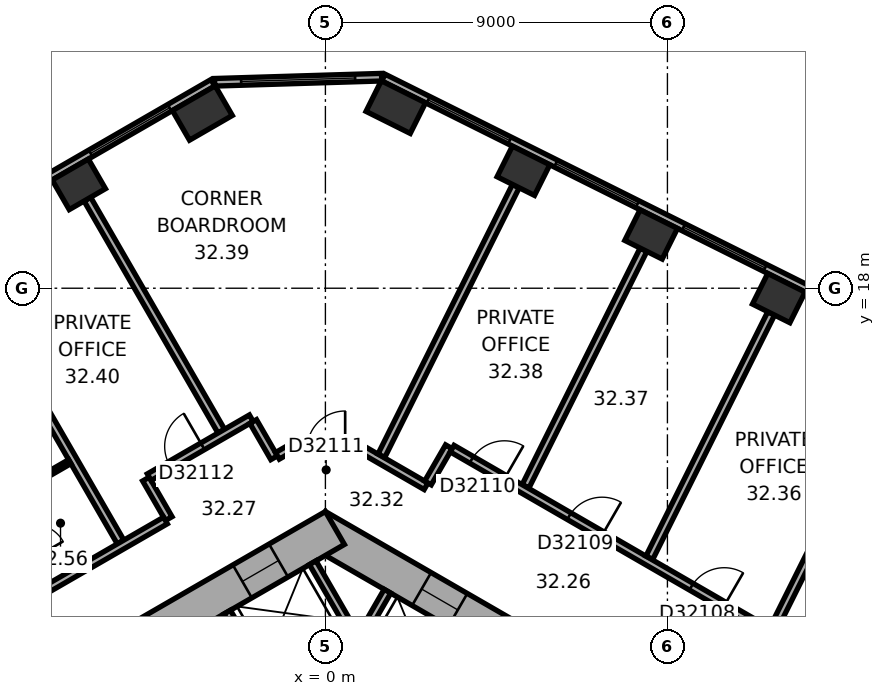
"""IFC4 building model, lengths in metres.
Left out: names, types, materials, properties, quantities, classifications, styles, units other than length and angle.
Written with IfcOpenShell. Run it as: python <this file> out.ifc"""

import sys

from ifc_helpers import new_model, si_unit, direction, frame, frame_2d, origin, origin_2d, place, context, subcontext, project, spatial, rectangle, extrude, element, fill, save


model = new_model("IFC4")
c1 = context("Model", 3, precision=1e-05, world=origin(), true_north=direction((0.0, 1.0)))
c2 = subcontext(c1, "Body", "Model", "MODEL_VIEW")
j1 = project(units=[si_unit("LENGTHUNIT", "METRE"), si_unit("PLANEANGLEUNIT", "RADIAN")], contexts=[c1])
p1 = place(None, origin())
s1 = spatial("IfcSite", under=j1, at=p1, CompositionType="ELEMENT")
p2 = place(p1, origin())
s2 = spatial("IfcBuilding", under=s1, at=p2, CompositionType="ELEMENT")
p3 = place(p2, frame((0.0, 0.0, 131.8)))
s3 = spatial("IfcBuildingStorey", under=s2, at=p3, CompositionType="ELEMENT", Elevation=131.8)
for number, where, z_axis, x_axis in (
    (1, (11.931, 17.74, 0.0), (0.0, 0.0, 1.0), (-0.895, 0.446, 0.0)),
    (2, (8.571, 19.416, 0.0), (0.0, 0.0, 1.0), (-0.895, 0.446, 0.0)),
    (3, (5.211, 21.091, 0.0), (0.0, 0.0, 1.0), (-0.895, 0.446, 0.0)),
):
    element("IfcColumn", number, at=place(p3, frame(where, z_axis=z_axis, x_axis=x_axis)), inside=s3, PredefinedType="COLUMN", context=c2, shape_type="SweptSolid", body=[
        extrude(rectangle(XDim=1.1, YDim=0.9, at=origin_2d()), origin(), (0.0, 0.0, 1.0), 3.7),
    ])
for number, where, z_axis, x_axis in (
    (4, (1.852, 22.766, 0.0), (0.0, 0.0, 1.0), (-0.895, 0.446, 0.0)),
    (5, (-3.238, 22.61, 0.0), (0.0, 0.0, 1.0), (-0.866, -0.5, 0.0)),
):
    element("IfcColumn", number, at=place(p3, frame(where, z_axis=z_axis, x_axis=x_axis)), inside=s3, PredefinedType="COLUMN", context=c2, shape_type="SweptSolid", body=[
        extrude(rectangle(XDim=1.3, YDim=0.9, at=origin_2d()), origin(), (0.0, 0.0, 1.0), 3.7),
    ])
p4 = place(p3, frame((-6.489, 20.733, 0.0), z_axis=(0.0, 0.0, 1.0), x_axis=(-0.866025403784, -0.5, 0.0)))
e6 = element("IfcColumn", 6, at=p4, inside=s3, PredefinedType="COLUMN", context=c2, shape_type="SweptSolid", body=[
    extrude(rectangle(XDim=1.1, YDim=0.9, at=origin_2d()), origin(), (0.0, 0.0, 1.0), 3.7),
])
p5 = place(p3, frame((10.25, 5.629, 0.0), z_axis=(0.0, 0.0, 1.0), x_axis=(-0.866022616891, 0.50000482701, 0.0)))
e7 = element("IfcWall", 7, at=p5, inside=s3, PredefinedType="SHEAR", context=c2, shape_type="SweptSolid", body=[
    extrude(rectangle(XDim=12.125, YDim=1.0, at=frame_2d((6.062, 0.0))), origin(), (0.0, 0.0, 1.0), 3.7),
])
p6 = place(p5, frame((2.612, 0.0, 0.0)))
e8 = element("IfcOpeningElement", 8, at=p6, cuts=e7, PredefinedType="OPENING", context=c2, shape_type="SweptSolid", body=[
    extrude(rectangle(XDim=1.1, YDim=2.1, at=frame_2d((0.55, 1.05))), frame((0.0, 0.51, 0.0), z_axis=(0.0, -1.0, 0.0), x_axis=(1.0, 0.0, 0.0)), (0.0, 0.0, 1.0), 1.02),
])
p7 = place(p5, frame((5.212, 0.0, 0.0)))
e9 = element("IfcOpeningElement", 9, at=p7, cuts=e7, PredefinedType="OPENING", context=c2, shape_type="SweptSolid", body=[
    extrude(rectangle(XDim=1.1, YDim=2.1, at=frame_2d((0.55, 1.05))), frame((0.0, 0.51, 0.0), z_axis=(0.0, -1.0, 0.0), x_axis=(1.0, 0.0, 0.0)), (0.0, 0.0, 1.0), 1.02),
])
p8 = place(p5, frame((7.812, 0.0, 0.0)))
e10 = element("IfcOpeningElement", 10, at=p8, cuts=e7, PredefinedType="OPENING", context=c2, shape_type="SweptSolid", body=[
    extrude(rectangle(XDim=1.1, YDim=2.1, at=frame_2d((0.55, 1.05))), frame((0.0, 0.51, 0.0), z_axis=(0.0, -1.0, 0.0), x_axis=(1.0, 0.0, 0.0)), (0.0, 0.0, 1.0), 1.02),
])
p9 = place(p3, frame((0.25, 11.691, 0.0), z_axis=(0.0, 0.0, 1.0), x_axis=(-0.866022616891, -0.50000482701, 0.0)))
e11 = element("IfcWall", 11, at=p9, inside=s3, PredefinedType="SHEAR", context=c2, shape_type="SweptSolid", body=[
    extrude(rectangle(XDim=12.125, YDim=1.0, at=frame_2d((6.062, 0.0))), origin(), (0.0, 0.0, 1.0), 3.7),
])
p10 = place(p9, frame((6.262, 0.0, 0.0)))
e12 = element("IfcOpeningElement", 12, at=p10, cuts=e11, PredefinedType="OPENING", context=c2, shape_type="SweptSolid", body=[
    extrude(rectangle(XDim=1.5, YDim=2.1, at=frame_2d((0.75, 1.05))), frame((0.0, 0.51, 0.0), z_axis=(0.0, -1.0, 0.0), x_axis=(1.0, 0.0, 0.0)), (0.0, 0.0, 1.0), 1.02),
])
p11 = place(p9, frame((1.712, 0.0, 0.0)))
e13 = element("IfcOpeningElement", 13, at=p11, cuts=e11, PredefinedType="OPENING", context=c2, shape_type="SweptSolid", body=[
    extrude(rectangle(XDim=1.1, YDim=2.1, at=frame_2d((0.55, 1.05))), frame((0.0, 0.51, 0.0), z_axis=(0.0, -1.0, 0.0), x_axis=(1.0, 0.0, 0.0)), (0.0, 0.0, 1.0), 1.02),
])
p12 = place(p3, frame((19.464, 14.599, 0.0), z_axis=(0.0, 0.0, 1.0), x_axis=(-0.894935755043, 0.446195018289, 0.0)))
e14 = element("IfcWall", 14, at=p12, inside=s3, PredefinedType="STANDARD", context=c2, shape_type="SweptSolid", body=[
    extrude(rectangle(XDim=20.044, YDim=0.2, at=frame_2d((10.022, 0.0))), origin(), (0.0, 0.0, 1.0), 3.7),
])
p13 = place(p12, frame((1.313, 0.0, 0.9)))
e15 = element("IfcOpeningElement", 15, at=p13, cuts=e14, PredefinedType="OPENING", context=c2, shape_type="SweptSolid", body=[
    extrude(rectangle(XDim=2.4, YDim=2.0, at=frame_2d((1.2, 1.0))), frame((0.0, 0.11, 0.0), z_axis=(0.0, -1.0, 0.0), x_axis=(1.0, 0.0, 0.0)), (0.0, 0.0, 1.0), 0.22),
])
p14 = place(p12, frame((5.067, 0.0, 0.9)))
e16 = element("IfcOpeningElement", 16, at=p14, cuts=e14, PredefinedType="OPENING", context=c2, shape_type="SweptSolid", body=[
    extrude(rectangle(XDim=2.4, YDim=2.0, at=frame_2d((1.2, 1.0))), frame((0.0, 0.11, 0.0), z_axis=(0.0, -1.0, 0.0), x_axis=(1.0, 0.0, 0.0)), (0.0, 0.0, 1.0), 0.22),
])
p15 = place(p12, frame((8.821, 0.0, 0.9)))
e17 = element("IfcOpeningElement", 17, at=p15, cuts=e14, PredefinedType="OPENING", context=c2, shape_type="SweptSolid", body=[
    extrude(rectangle(XDim=2.4, YDim=2.0, at=frame_2d((1.2, 1.0))), frame((0.0, 0.11, 0.0), z_axis=(0.0, -1.0, 0.0), x_axis=(1.0, 0.0, 0.0)), (0.0, 0.0, 1.0), 0.22),
])
p16 = place(p12, frame((12.575, 0.0, 0.9)))
e18 = element("IfcOpeningElement", 18, at=p16, cuts=e14, PredefinedType="OPENING", context=c2, shape_type="SweptSolid", body=[
    extrude(rectangle(XDim=2.4, YDim=2.0, at=frame_2d((1.2, 1.0))), frame((0.0, 0.11, 0.0), z_axis=(0.0, -1.0, 0.0), x_axis=(1.0, 0.0, 0.0)), (0.0, 0.0, 1.0), 0.22),
])
p17 = place(p12, frame((16.329, 0.0, 0.9)))
e19 = element("IfcOpeningElement", 19, at=p17, cuts=e14, PredefinedType="OPENING", context=c2, shape_type="SweptSolid", body=[
    extrude(rectangle(XDim=2.4, YDim=2.0, at=frame_2d((1.2, 1.0))), frame((0.0, 0.11, 0.0), z_axis=(0.0, -1.0, 0.0), x_axis=(1.0, 0.0, 0.0)), (0.0, 0.0, 1.0), 0.22),
])
p18 = place(p3, frame((1.479, 23.553, 0.0), z_axis=(0.0, 0.0, 1.0), x_axis=(-0.999534786117, -0.03049936625, 0.0)))
e20 = element("IfcWall", 20, at=p18, inside=s3, PredefinedType="STANDARD", context=c2, shape_type="SweptSolid", body=[
    extrude(rectangle(XDim=4.395, YDim=0.2, at=frame_2d((2.197, 0.0))), origin(), (0.0, 0.0, 1.0), 3.7),
])
p19 = place(p18, frame((0.698, 0.0, 0.9)))
e21 = element("IfcOpeningElement", 21, at=p19, cuts=e20, PredefinedType="OPENING", context=c2, shape_type="SweptSolid", body=[
    extrude(rectangle(XDim=3.0, YDim=2.0, at=frame_2d((1.5, 1.0))), frame((0.0, 0.11, 0.0), z_axis=(0.0, -1.0, 0.0), x_axis=(1.0, 0.0, 0.0)), (0.0, 0.0, 1.0), 0.22),
])
p20 = place(p3, frame((-2.961, 23.405, 0.0), z_axis=(0.0, 0.0, 1.0), x_axis=(-0.866023315909, -0.500003616288, 0.0)))
e22 = element("IfcWall", 22, at=p20, inside=s3, PredefinedType="STANDARD", context=c2, shape_type="SweptSolid", body=[
    extrude(rectangle(XDim=20.044, YDim=0.2, at=frame_2d((10.022, 0.0))), origin(), (0.0, 0.0, 1.0), 3.7),
])
p21 = place(p20, frame((1.314, 0.0, 0.9)))
e23 = element("IfcOpeningElement", 23, at=p21, cuts=e22, PredefinedType="OPENING", context=c2, shape_type="SweptSolid", body=[
    extrude(rectangle(XDim=2.4, YDim=2.0, at=frame_2d((1.2, 1.0))), frame((0.0, 0.11, 0.0), z_axis=(0.0, -1.0, 0.0), x_axis=(1.0, 0.0, 0.0)), (0.0, 0.0, 1.0), 0.22),
])
p22 = place(p20, frame((5.069, 0.0, 0.9)))
e24 = element("IfcOpeningElement", 24, at=p22, cuts=e22, PredefinedType="OPENING", context=c2, shape_type="SweptSolid", body=[
    extrude(rectangle(XDim=2.4, YDim=2.0, at=frame_2d((1.2, 1.0))), frame((0.0, 0.11, 0.0), z_axis=(0.0, -1.0, 0.0), x_axis=(1.0, 0.0, 0.0)), (0.0, 0.0, 1.0), 0.22),
])
p23 = place(p20, frame((8.823, 0.0, 0.9)))
e25 = element("IfcOpeningElement", 25, at=p23, cuts=e22, PredefinedType="OPENING", context=c2, shape_type="SweptSolid", body=[
    extrude(rectangle(XDim=2.4, YDim=2.0, at=frame_2d((1.2, 1.0))), frame((0.0, 0.11, 0.0), z_axis=(0.0, -1.0, 0.0), x_axis=(1.0, 0.0, 0.0)), (0.0, 0.0, 1.0), 0.22),
])
p24 = place(p20, frame((12.577, 0.0, 0.9)))
e26 = element("IfcOpeningElement", 26, at=p24, cuts=e22, PredefinedType="OPENING", context=c2, shape_type="SweptSolid", body=[
    extrude(rectangle(XDim=2.4, YDim=2.0, at=frame_2d((1.2, 1.0))), frame((0.0, 0.11, 0.0), z_axis=(0.0, -1.0, 0.0), x_axis=(1.0, 0.0, 0.0)), (0.0, 0.0, 1.0), 0.22),
])
p25 = place(p20, frame((16.331, 0.0, 0.9)))
e27 = element("IfcOpeningElement", 27, at=p25, cuts=e22, PredefinedType="OPENING", context=c2, shape_type="SweptSolid", body=[
    extrude(rectangle(XDim=2.4, YDim=2.0, at=frame_2d((1.2, 1.0))), frame((0.0, 0.11, 0.0), z_axis=(0.0, -1.0, 0.0), x_axis=(1.0, 0.0, 0.0)), (0.0, 0.0, 1.0), 0.22),
])
p26 = place(p3, frame((0.532, 8.122, 0.0), z_axis=(0.0, 0.0, 1.0), x_axis=(0.500077893725, 0.86598042715, 0.0)))
e28 = element("IfcWall", 28, at=p26, inside=s3, PredefinedType="PARTITIONING", context=c2, shape_type="SweptSolid", body=[
    extrude(rectangle(XDim=2.2, YDim=0.2, at=frame_2d((1.1, 0.0))), origin(), (0.0, 0.0, 1.0), 3.42),
])
p27 = place(p3, frame((0.767, 8.872, 0.0), z_axis=(0.0, 0.0, 1.0), x_axis=(-0.499994660107, 0.866028486751, 0.0)))
e29 = element("IfcWall", 29, at=p27, inside=s3, PredefinedType="PARTITIONING", context=c2, shape_type="SweptSolid", body=[
    extrude(rectangle(XDim=2.2, YDim=0.2, at=frame_2d((1.1, 0.0))), origin(), (0.0, 0.0, 1.0), 3.42),
])
p28 = place(p3, frame((-1.485, 7.572, 0.0), z_axis=(0.0, 0.0, 1.0), x_axis=(-0.50002983664, 0.866008176907, 0.0)))
e30 = element("IfcWall", 30, at=p28, inside=s3, PredefinedType="PARTITIONING", context=c2, shape_type="SweptSolid", body=[
    extrude(rectangle(XDim=2.2, YDim=0.2, at=frame_2d((1.1, 0.0))), origin(), (0.0, 0.0, 1.0), 3.42),
])
p29 = place(p3, frame((-9.515, 18.466, 0.0), z_axis=(0.0, 0.0, 1.0), x_axis=(0.500009360108, -0.866019999656, 0.0)))
e31 = element("IfcWall", 31, at=p29, inside=s3, PredefinedType="PARTITIONING", context=c2, shape_type="SweptSolid", body=[
    extrude(rectangle(XDim=8.25, YDim=0.2, at=frame_2d((4.125, 0.0))), origin(), (0.0, 0.0, 1.0), 2.87),
])
p30 = place(p3, frame((-8.545, 12.387, 0.0), z_axis=(0.0, 0.0, 1.0), x_axis=(0.866009402589, 0.500027713859, 0.0)))
e32 = element("IfcWall", 32, at=p30, inside=s3, PredefinedType="PARTITIONING", context=c2, shape_type="SweptSolid", body=[
    extrude(rectangle(XDim=2.1, YDim=0.12, at=frame_2d((1.05, 0.0))), origin(), (0.0, 0.0, 1.0), 3.42),
])
p31 = place(p3, frame((-6.264, 20.344, 0.0), z_axis=(0.0, 0.0, 1.0), x_axis=(0.500009260695, -0.866020057054, 0.0)))
e33 = element("IfcWall", 33, at=p31, inside=s3, PredefinedType="PARTITIONING", context=c2, shape_type="SweptSolid", body=[
    extrude(rectangle(XDim=7.049, YDim=0.2, at=frame_2d((3.524, 0.0))), origin(), (0.0, 0.0, 1.0), 3.42),
])
p32 = place(p3, frame((-4.723, 12.978, 0.0), z_axis=(0.0, 0.0, 1.0), x_axis=(0.500074377092, -0.865982457891, 0.0)))
e34 = element("IfcWall", 34, at=p32, inside=s3, PredefinedType="PARTITIONING", context=c2, shape_type="SweptSolid", body=[
    extrude(rectangle(XDim=1.201, YDim=0.2, at=frame_2d((0.601, 0.0))), origin(), (0.0, 0.0, 1.0), 3.42),
])
p33 = place(p3, frame((-4.209, 11.888, 0.0), z_axis=(0.0, 0.0, 1.0), x_axis=(-0.866020930448, -0.500007747966, 0.0)))
e35 = element("IfcWall", 35, at=p33, inside=s3, PredefinedType="PARTITIONING", context=c2, shape_type="SweptSolid", body=[
    extrude(rectangle(XDim=8.321, YDim=0.2, at=frame_2d((4.161, 0.0))), origin(), (0.0, 0.0, 1.0), 3.42),
])
p34 = place(p33, frame((5.439, 0.0, 0.0)))
e36 = element("IfcOpeningElement", 36, at=p34, cuts=e35, PredefinedType="OPENING", context=c2, shape_type="SweptSolid", body=[
    extrude(rectangle(XDim=1.0, YDim=2.1, at=frame_2d((0.5, 1.05))), frame((0.0, 0.11, 0.0), z_axis=(0.0, -1.0, 0.0), x_axis=(1.0, 0.0, 0.0)), (0.0, 0.0, 1.0), 0.22),
])
p35 = place(p3, frame((-1.95, 14.579, 0.0), z_axis=(0.0, 0.0, 1.0), x_axis=(-0.866011260204, -0.500024496599, 0.0)))
e37 = element("IfcWall", 37, at=p35, inside=s3, PredefinedType="PARTITIONING", context=c2, shape_type="SweptSolid", body=[
    extrude(rectangle(XDim=3.102, YDim=0.2, at=frame_2d((1.551, 0.0))), origin(), (0.0, 0.0, 1.0), 3.42),
])
p36 = place(p35, frame((1.478, 0.0, 0.0)))
e38 = element("IfcOpeningElement", 38, at=p36, cuts=e37, PredefinedType="OPENING", context=c2, shape_type="SweptSolid", body=[
    extrude(rectangle(XDim=1.0, YDim=2.1, at=frame_2d((0.5, 1.05))), frame((0.0, 0.11, 0.0), z_axis=(0.0, -1.0, 0.0), x_axis=(1.0, 0.0, 0.0)), (0.0, 0.0, 1.0), 0.22),
])
p37 = place(p3, frame((-1.349, 13.539, 0.0), z_axis=(0.0, 0.0, 1.0), x_axis=(-0.500074377092, 0.865982457891, 0.0)))
e39 = element("IfcWall", 39, at=p37, inside=s3, PredefinedType="PARTITIONING", context=c2, shape_type="SweptSolid", body=[
    extrude(rectangle(XDim=1.101, YDim=0.2, at=frame_2d((0.55, 0.0))), origin(), (0.0, 0.0, 1.0), 3.42),
])
p38 = place(p3, frame((-0.95, 13.77, 0.0), z_axis=(0.0, 0.0, 1.0), x_axis=(-0.865904111586, -0.500210025428, 0.0)))
e40 = element("IfcWall", 40, at=p38, inside=s3, PredefinedType="PARTITIONING", context=c2, shape_type="SweptSolid", body=[
    extrude(rectangle(XDim=0.361, YDim=0.2, at=frame_2d((0.181, 0.0))), origin(), (0.0, 0.0, 1.0), 3.42),
])
p39 = place(p3, frame((0.95, 13.77, 0.0), z_axis=(0.0, 0.0, 1.0), x_axis=(-1.0, 0.0, 0.0)))
e41 = element("IfcWall", 41, at=p39, inside=s3, PredefinedType="PARTITIONING", context=c2, shape_type="SweptSolid", body=[
    extrude(rectangle(XDim=1.86, YDim=0.2, at=frame_2d((0.93, 0.0))), origin(), (0.0, 0.0, 1.0), 3.42),
])
p40 = place(p39, frame((0.43, 0.0, 0.0)))
e42 = element("IfcOpeningElement", 42, at=p40, cuts=e41, PredefinedType="OPENING", context=c2, shape_type="SweptSolid", body=[
    extrude(rectangle(XDim=1.0, YDim=2.1, at=frame_2d((0.5, 1.05))), frame((0.0, 0.11, 0.0), z_axis=(0.0, -1.0, 0.0), x_axis=(1.0, 0.0, 0.0)), (0.0, 0.0, 1.0), 0.22),
])
p41 = place(p3, frame((2.648, 12.789, 0.0), z_axis=(0.0, 0.0, 1.0), x_axis=(-0.8660607342, 0.499938800931, 0.0)))
e43 = element("IfcWall", 43, at=p41, inside=s3, PredefinedType="PARTITIONING", context=c2, shape_type="SweptSolid", body=[
    extrude(rectangle(XDim=1.921, YDim=0.2, at=frame_2d((0.96, 0.0))), origin(), (0.0, 0.0, 1.0), 3.42),
])
p42 = place(p3, frame((3.249, 13.829, 0.0), z_axis=(0.0, 0.0, 1.0), x_axis=(-0.499812034598, -0.866133898465, 0.0)))
e44 = element("IfcWall", 44, at=p42, inside=s3, PredefinedType="PARTITIONING", context=c2, shape_type="SweptSolid", body=[
    extrude(rectangle(XDim=1.101, YDim=0.2, at=frame_2d((0.551, 0.0))), origin(), (0.0, 0.0, 1.0), 3.42),
])
p43 = place(p3, frame((5.01, 20.688, 0.0), z_axis=(0.0, 0.0, 1.0), x_axis=(-0.446203062394, -0.894931744386, 0.0)))
e45 = element("IfcWall", 45, at=p43, inside=s3, PredefinedType="PARTITIONING", context=c2, shape_type="SweptSolid", body=[
    extrude(rectangle(XDim=7.927, YDim=0.2, at=frame_2d((3.963, 0.0))), origin(), (0.0, 0.0, 1.0), 2.87),
])
p44 = place(p3, frame((8.37, 19.013, 0.0), z_axis=(0.0, 0.0, 1.0), x_axis=(-0.446187985757, -0.894939261272, 0.0)))
e46 = element("IfcWall", 46, at=p44, inside=s3, PredefinedType="PARTITIONING", context=c2, shape_type="SweptSolid", body=[
    extrude(rectangle(XDim=6.953, YDim=0.2, at=frame_2d((3.477, 0.0))), origin(), (0.0, 0.0, 1.0), 3.42),
])
p45 = place(p3, frame((11.646, 8.981, 0.0), z_axis=(0.0, 0.0, 1.0), x_axis=(-0.866027142779, 0.499996987961, 0.0)))
e47 = element("IfcWall", 47, at=p45, inside=s3, PredefinedType="PARTITIONING", context=c2, shape_type="SweptSolid", body=[
    extrude(rectangle(XDim=9.597, YDim=0.2, at=frame_2d((4.798, 0.0))), origin(), (0.0, 0.0, 1.0), 3.42),
])
p46 = place(p45, frame((1.331, 0.0, 0.0)))
e48 = element("IfcOpeningElement", 48, at=p46, cuts=e47, PredefinedType="OPENING", context=c2, shape_type="SweptSolid", body=[
    extrude(rectangle(XDim=1.0, YDim=2.1, at=frame_2d((0.5, 1.05))), frame((0.0, 0.11, 0.0), z_axis=(0.0, -1.0, 0.0), x_axis=(1.0, 0.0, 0.0)), (0.0, 0.0, 1.0), 0.22),
])
p47 = place(p45, frame((5.042, 0.0, 0.0)))
e49 = element("IfcOpeningElement", 49, at=p47, cuts=e47, PredefinedType="OPENING", context=c2, shape_type="SweptSolid", body=[
    extrude(rectangle(XDim=1.0, YDim=2.1, at=frame_2d((0.5, 1.05))), frame((0.0, 0.11, 0.0), z_axis=(0.0, -1.0, 0.0), x_axis=(1.0, 0.0, 0.0)), (0.0, 0.0, 1.0), 0.22),
])
p48 = place(p45, frame((8.01, 0.0, 0.0)))
e50 = element("IfcOpeningElement", 50, at=p48, cuts=e47, PredefinedType="OPENING", context=c2, shape_type="SweptSolid", body=[
    extrude(rectangle(XDim=1.0, YDim=2.1, at=frame_2d((0.5, 1.05))), frame((0.0, 0.11, 0.0), z_axis=(0.0, -1.0, 0.0), x_axis=(1.0, 0.0, 0.0)), (0.0, 0.0, 1.0), 0.22),
])
p49 = place(p3, frame((11.73, 17.338, 0.0), z_axis=(0.0, 0.0, 1.0), x_axis=(-0.446193589186, -0.894936467561, 0.0)))
e51 = element("IfcWall", 51, at=p49, inside=s3, PredefinedType="PARTITIONING", context=c2, shape_type="SweptSolid", body=[
    extrude(rectangle(XDim=7.183, YDim=0.2, at=frame_2d((3.591, 0.0))), origin(), (0.0, 0.0, 1.0), 2.87),
])
p50 = place(p3, frame((14.601, 9.931, 0.0), z_axis=(0.0, 0.0, 1.0), x_axis=(-0.866023285932, -0.50000366821, 0.0)))
e52 = element("IfcWall", 52, at=p50, inside=s3, PredefinedType="PARTITIONING", context=c2, shape_type="SweptSolid", body=[
    extrude(rectangle(XDim=2.48, YDim=0.12, at=frame_2d((1.24, 0.0))), origin(), (0.0, 0.0, 1.0), 3.42),
])
p51 = place(p50, frame((0.79, 0.0, 0.0)))
e53 = element("IfcOpeningElement", 53, at=p51, cuts=e52, PredefinedType="OPENING", context=c2, shape_type="SweptSolid", body=[
    extrude(rectangle(XDim=0.9, YDim=2.1, at=frame_2d((0.45, 1.05))), frame((0.0, 0.07, 0.0), z_axis=(0.0, -1.0, 0.0), x_axis=(1.0, 0.0, 0.0)), (0.0, 0.0, 1.0), 0.14),
])
p52 = place(p3, frame((15.09, 15.663, 0.0), z_axis=(0.0, 0.0, 1.0), x_axis=(-0.446203977428, -0.89493128816, 0.0)))
e54 = element("IfcWall", 54, at=p52, inside=s3, PredefinedType="PARTITIONING", context=c2, shape_type="SweptSolid", body=[
    extrude(rectangle(XDim=7.45, YDim=0.2, at=frame_2d((3.725, 0.0))), origin(), (0.0, 0.0, 1.0), 3.42),
])
p53 = place(p15, origin())
e55 = element("IfcWindow", 55, at=p53, inside=s3, PartitioningType="SINGLE_PANEL", PredefinedType="WINDOW", context=c2, shape_type="SweptSolid", body=[
    extrude(rectangle(XDim=2.4, YDim=2.0, at=frame_2d((1.2, 1.0))), frame((0.0, 0.03, 0.0), z_axis=(0.0, -1.0, 0.0), x_axis=(1.0, 0.0, 0.0)), (0.0, 0.0, 1.0), 0.06),
])
fill(e17, e55)
p54 = place(p16, origin())
e56 = element("IfcWindow", 56, at=p54, inside=s3, PartitioningType="SINGLE_PANEL", PredefinedType="WINDOW", context=c2, shape_type="SweptSolid", body=[
    extrude(rectangle(XDim=2.4, YDim=2.0, at=frame_2d((1.2, 1.0))), frame((0.0, 0.03, 0.0), z_axis=(0.0, -1.0, 0.0), x_axis=(1.0, 0.0, 0.0)), (0.0, 0.0, 1.0), 0.06),
])
fill(e18, e56)
p55 = place(p17, origin())
e57 = element("IfcWindow", 57, at=p55, inside=s3, PartitioningType="SINGLE_PANEL", PredefinedType="WINDOW", context=c2, shape_type="SweptSolid", body=[
    extrude(rectangle(XDim=2.4, YDim=2.0, at=frame_2d((1.2, 1.0))), frame((0.0, 0.03, 0.0), z_axis=(0.0, -1.0, 0.0), x_axis=(1.0, 0.0, 0.0)), (0.0, 0.0, 1.0), 0.06),
])
fill(e19, e57)
p56 = place(p19, origin())
e58 = element("IfcWindow", 58, at=p56, inside=s3, PartitioningType="SINGLE_PANEL", PredefinedType="WINDOW", context=c2, shape_type="SweptSolid", body=[
    extrude(rectangle(XDim=3.0, YDim=2.0, at=frame_2d((1.5, 1.0))), frame((0.0, 0.03, 0.0), z_axis=(0.0, -1.0, 0.0), x_axis=(1.0, 0.0, 0.0)), (0.0, 0.0, 1.0), 0.06),
])
fill(e21, e58)
p57 = place(p21, origin())
e59 = element("IfcWindow", 59, at=p57, inside=s3, PartitioningType="SINGLE_PANEL", PredefinedType="WINDOW", context=c2, shape_type="SweptSolid", body=[
    extrude(rectangle(XDim=2.4, YDim=2.0, at=frame_2d((1.2, 1.0))), frame((0.0, 0.03, 0.0), z_axis=(0.0, -1.0, 0.0), x_axis=(1.0, 0.0, 0.0)), (0.0, 0.0, 1.0), 0.06),
])
fill(e23, e59)
p58 = place(p8, origin())
e60 = element("IfcDoor", 60, at=p58, inside=s3, OperationType="DOUBLE_DOOR_SLIDING", PredefinedType="DOOR", context=c2, shape_type="SweptSolid", body=[
    extrude(rectangle(XDim=1.1, YDim=2.1, at=frame_2d((0.55, 1.05))), frame((0.0, 0.025, 0.0), z_axis=(0.0, -1.0, 0.0), x_axis=(1.0, 0.0, 0.0)), (0.0, 0.0, 1.0), 0.05),
])
fill(e10, e60)
p59 = place(p11, origin())
e61 = element("IfcDoor", 61, at=p59, inside=s3, OperationType="DOUBLE_DOOR_SLIDING", PredefinedType="DOOR", context=c2, shape_type="SweptSolid", body=[
    extrude(rectangle(XDim=1.1, YDim=2.1, at=frame_2d((0.55, 1.05))), frame((0.0, 0.025, 0.0), z_axis=(0.0, -1.0, 0.0), x_axis=(1.0, 0.0, 0.0)), (0.0, 0.0, 1.0), 0.05),
])
fill(e13, e61)
p60 = place(p46, origin())
e62 = element("IfcDoor", 62, at=p60, inside=s3, OperationType="SINGLE_SWING_LEFT", PredefinedType="DOOR", context=c2, shape_type="SweptSolid", body=[
    extrude(rectangle(XDim=1.0, YDim=2.1, at=frame_2d((0.5, 1.05))), frame((0.0, 0.025, 0.0), z_axis=(0.0, -1.0, 0.0), x_axis=(1.0, 0.0, 0.0)), (0.0, 0.0, 1.0), 0.05),
])
fill(e48, e62)
p61 = place(p47, origin())
e63 = element("IfcDoor", 63, at=p61, inside=s3, OperationType="SINGLE_SWING_LEFT", PredefinedType="DOOR", context=c2, shape_type="SweptSolid", body=[
    extrude(rectangle(XDim=1.0, YDim=2.1, at=frame_2d((0.5, 1.05))), frame((0.0, 0.025, 0.0), z_axis=(0.0, -1.0, 0.0), x_axis=(1.0, 0.0, 0.0)), (0.0, 0.0, 1.0), 0.05),
])
fill(e49, e63)
p62 = place(p48, origin())
e64 = element("IfcDoor", 64, at=p62, inside=s3, OperationType="SINGLE_SWING_LEFT", PredefinedType="DOOR", context=c2, shape_type="SweptSolid", body=[
    extrude(rectangle(XDim=1.0, YDim=2.1, at=frame_2d((0.5, 1.05))), frame((0.0, 0.025, 0.0), z_axis=(0.0, -1.0, 0.0), x_axis=(1.0, 0.0, 0.0)), (0.0, 0.0, 1.0), 0.05),
])
fill(e50, e64)
p63 = place(p40, origin())
e65 = element("IfcDoor", 65, at=p63, inside=s3, OperationType="SINGLE_SWING_LEFT", PredefinedType="DOOR", context=c2, shape_type="SweptSolid", body=[
    extrude(rectangle(XDim=1.0, YDim=2.1, at=frame_2d((0.5, 1.05))), frame((0.0, 0.025, 0.0), z_axis=(0.0, -1.0, 0.0), x_axis=(1.0, 0.0, 0.0)), (0.0, 0.0, 1.0), 0.05),
])
fill(e42, e65)
p64 = place(p36, origin())
e66 = element("IfcDoor", 66, at=p64, inside=s3, OperationType="SINGLE_SWING_LEFT", PredefinedType="DOOR", context=c2, shape_type="SweptSolid", body=[
    extrude(rectangle(XDim=1.0, YDim=2.1, at=frame_2d((0.5, 1.05))), frame((0.0, 0.025, 0.0), z_axis=(0.0, -1.0, 0.0), x_axis=(1.0, 0.0, 0.0)), (0.0, 0.0, 1.0), 0.05),
])
fill(e38, e66)
save(model, sys.argv[1])
